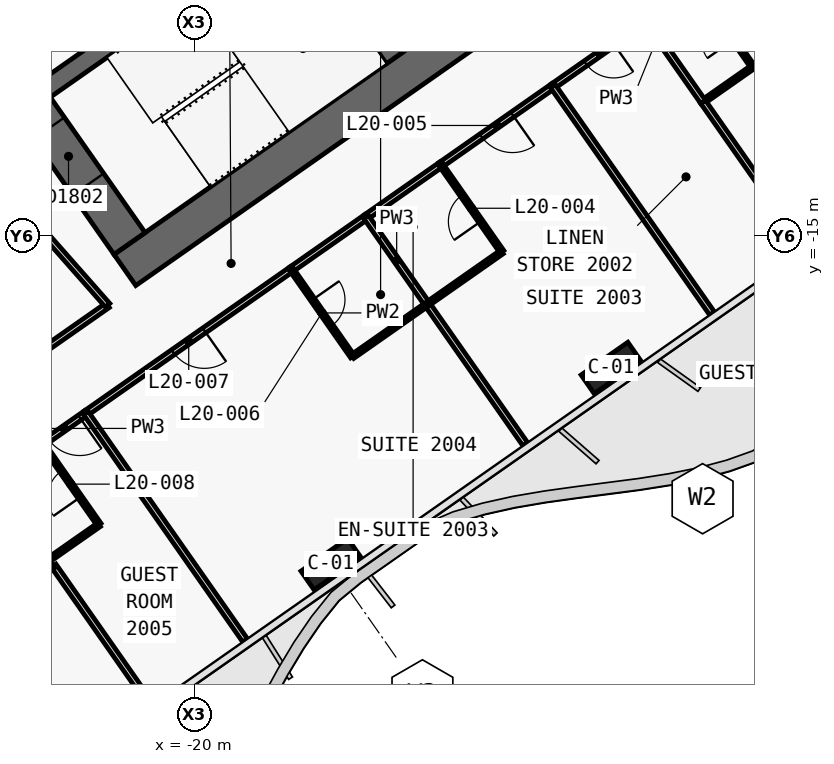
"""IFC4 building model, lengths in metres.
Left out: names, types, materials, properties, quantities, classifications, styles, units other than length and angle.
Written with IfcOpenShell. Run it as: python <this file> out.ifc"""

import sys

from ifc_helpers import new_model, si_unit, direction, frame, frame_2d, origin, origin_2d, place, context, subcontext, project, spatial, polyline, rectangle, outline, extrude, element, fill, save


model = new_model("IFC4")
c1 = context("Model", 3, precision=1e-05, world=origin(), true_north=direction((0.0, 1.0)))
c2 = subcontext(c1, "Body", "Model", "MODEL_VIEW")
j1 = project(units=[si_unit("LENGTHUNIT", "METRE"), si_unit("PLANEANGLEUNIT", "RADIAN")], contexts=[c1])
p1 = place(None, origin())
s1 = spatial("IfcSite", under=j1, at=p1, CompositionType="ELEMENT")
p2 = place(p1, origin())
s2 = spatial("IfcBuilding", under=s1, at=p2, CompositionType="ELEMENT")
p3 = place(p2, frame((0.0, 0.0, 97.7)))
s3 = spatial("IfcBuildingStorey", under=s2, at=p3, CompositionType="ELEMENT", Elevation=97.7)
p4 = place(p3, frame((0.037, -0.585, 0.0), z_axis=(0.0, 0.0, 1.0), x_axis=(-0.819157152511, -0.573569140985, 0.0)))
e1 = element("IfcWall", 1, at=p4, inside=s3, PredefinedType="SHEAR", context=c2, shape_type="SweptSolid", body=[
    extrude(outline(polyline([(26.695, 0.5), (0.7, 0.5), (0.0, -0.5), (26.695, -0.5), (26.695, 0.5)])), origin(), (0.0, 0.0, 1.0), 3.6),
])
p5 = place(p4, frame((2.995, 0.0, 0.0)))
e2 = element("IfcOpeningElement", 2, at=p5, cuts=e1, PredefinedType="OPENING", context=c2, shape_type="SweptSolid", body=[
    extrude(rectangle(XDim=2.4, YDim=2.1, at=frame_2d((1.2, 1.05))), frame((0.0, 0.51, 0.0), z_axis=(0.0, -1.0, 0.0), x_axis=(1.0, 0.0, 0.0)), (0.0, 0.0, 1.0), 1.02),
])
p6 = place(p4, frame((11.995, 0.0, 0.0)))
e3 = element("IfcOpeningElement", 3, at=p6, cuts=e1, PredefinedType="OPENING", context=c2, shape_type="SweptSolid", body=[
    extrude(rectangle(XDim=2.4, YDim=2.1, at=frame_2d((1.2, 1.05))), frame((0.0, 0.51, 0.0), z_axis=(0.0, -1.0, 0.0), x_axis=(1.0, 0.0, 0.0)), (0.0, 0.0, 1.0), 1.02),
])
p7 = place(p3, frame((-21.708, -15.2, 0.0), z_axis=(0.0, 0.0, 1.0), x_axis=(-0.573576324356, 0.819152122709, 0.0)))
e4 = element("IfcWall", 4, at=p7, inside=s3, PredefinedType="SHEAR", context=c2, shape_type="SweptSolid", body=[
    extrude(outline(polyline([(0.0, 0.5), (0.0, -0.5), (9.2, -0.5), (9.2, 0.5), (0.0, 0.5)])), origin(), (0.0, 0.0, 1.0), 3.6),
])
p8 = place(p7, frame((6.1, 0.0, 0.0)))
e5 = element("IfcOpeningElement", 5, at=p8, cuts=e4, PredefinedType="OPENING", context=c2, shape_type="SweptSolid", body=[
    extrude(rectangle(XDim=1.8, YDim=2.1, at=frame_2d((0.9, 1.05))), frame((0.0, 0.51, 0.0), z_axis=(0.0, -1.0, 0.0), x_axis=(1.0, 0.0, 0.0)), (0.0, 0.0, 1.0), 1.02),
])
p9 = place(p7, frame((1.9, 0.0, 0.0)))
e6 = element("IfcOpeningElement", 6, at=p9, cuts=e4, PredefinedType="OPENING", context=c2, shape_type="SweptSolid", body=[
    extrude(rectangle(XDim=1.8, YDim=2.1, at=frame_2d((0.9, 1.05))), frame((0.0, 0.51, 0.0), z_axis=(0.0, -1.0, 0.0), x_axis=(1.0, 0.0, 0.0)), (0.0, 0.0, 1.0), 1.02),
])
p10 = place(p3, frame((-14.745, -10.324, 0.0), z_axis=(0.0, 0.0, 1.0), x_axis=(-0.57356780395, 0.819158088694, 0.0)))
e7 = element("IfcWall", 7, at=p10, inside=s3, PredefinedType="SHEAR", context=c2, shape_type="SweptSolid", body=[
    extrude(outline(polyline([(4.35, 0.25), (0.0, 0.25), (0.0, -0.25), (4.35, -0.25), (4.35, 0.25)])), origin(), (0.0, 0.0, 1.0), 3.6),
])
p11 = place(p3, frame((-2.638, 3.768, 0.0), z_axis=(0.0, 0.0, 1.0), x_axis=(-0.819148977158, -0.573580816643, 0.0)))
e8 = element("IfcWall", 8, at=p11, inside=s3, PredefinedType="SHEAR", context=c2, shape_type="SweptSolid", body=[
    extrude(outline(polyline([(26.0, 0.25), (0.0, 0.25), (0.0, -0.25), (26.0, -0.25), (26.0, 0.25)])), origin(), (0.0, 0.0, 1.0), 3.6),
])
p12 = place(p11, frame((1.169, 0.0, 0.0)))
e9 = element("IfcOpeningElement", 9, at=p12, cuts=e8, PredefinedType="OPENING", context=c2, shape_type="SweptSolid", body=[
    extrude(rectangle(XDim=1.1, YDim=2.1, at=frame_2d((0.55, 1.05))), frame((0.0, 0.26, 0.0), z_axis=(0.0, -1.0, 0.0), x_axis=(1.0, 0.0, 0.0)), (0.0, 0.0, 1.0), 0.52),
])
p13 = place(p11, frame((3.206, 0.0, 0.0)))
e10 = element("IfcOpeningElement", 10, at=p13, cuts=e8, PredefinedType="OPENING", context=c2, shape_type="SweptSolid", body=[
    extrude(rectangle(XDim=1.1, YDim=2.1, at=frame_2d((0.55, 1.05))), frame((0.0, 0.26, 0.0), z_axis=(0.0, -1.0, 0.0), x_axis=(1.0, 0.0, 0.0)), (0.0, 0.0, 1.0), 0.52),
])
p14 = place(p11, frame((5.244, 0.0, 0.0)))
e11 = element("IfcOpeningElement", 11, at=p14, cuts=e8, PredefinedType="OPENING", context=c2, shape_type="SweptSolid", body=[
    extrude(rectangle(XDim=1.1, YDim=2.1, at=frame_2d((0.55, 1.05))), frame((0.0, 0.26, 0.0), z_axis=(0.0, -1.0, 0.0), x_axis=(1.0, 0.0, 0.0)), (0.0, 0.0, 1.0), 0.52),
])
p15 = place(p11, frame((7.281, 0.0, 0.0)))
e12 = element("IfcOpeningElement", 12, at=p15, cuts=e8, PredefinedType="OPENING", context=c2, shape_type="SweptSolid", body=[
    extrude(rectangle(XDim=1.1, YDim=2.1, at=frame_2d((0.55, 1.05))), frame((0.0, 0.26, 0.0), z_axis=(0.0, -1.0, 0.0), x_axis=(1.0, 0.0, 0.0)), (0.0, 0.0, 1.0), 0.52),
])
p16 = place(p11, frame((9.688, 0.0, 0.0)))
e13 = element("IfcOpeningElement", 13, at=p16, cuts=e8, PredefinedType="OPENING", context=c2, shape_type="SweptSolid", body=[
    extrude(rectangle(XDim=1.1, YDim=2.1, at=frame_2d((0.55, 1.05))), frame((0.0, 0.26, 0.0), z_axis=(0.0, -1.0, 0.0), x_axis=(1.0, 0.0, 0.0)), (0.0, 0.0, 1.0), 0.52),
])
p17 = place(p11, frame((11.863, 0.0, 0.0)))
e14 = element("IfcOpeningElement", 14, at=p17, cuts=e8, PredefinedType="OPENING", context=c2, shape_type="SweptSolid", body=[
    extrude(rectangle(XDim=1.1, YDim=2.1, at=frame_2d((0.55, 1.05))), frame((0.0, 0.26, 0.0), z_axis=(0.0, -1.0, 0.0), x_axis=(1.0, 0.0, 0.0)), (0.0, 0.0, 1.0), 0.52),
])
p18 = place(p11, frame((14.038, 0.0, 0.0)))
e15 = element("IfcOpeningElement", 15, at=p18, cuts=e8, PredefinedType="OPENING", context=c2, shape_type="SweptSolid", body=[
    extrude(rectangle(XDim=1.1, YDim=2.1, at=frame_2d((0.55, 1.05))), frame((0.0, 0.26, 0.0), z_axis=(0.0, -1.0, 0.0), x_axis=(1.0, 0.0, 0.0)), (0.0, 0.0, 1.0), 0.52),
])
p19 = place(p11, frame((16.212, 0.0, 0.0)))
e16 = element("IfcOpeningElement", 16, at=p19, cuts=e8, PredefinedType="OPENING", context=c2, shape_type="SweptSolid", body=[
    extrude(rectangle(XDim=1.1, YDim=2.1, at=frame_2d((0.55, 1.05))), frame((0.0, 0.26, 0.0), z_axis=(0.0, -1.0, 0.0), x_axis=(1.0, 0.0, 0.0)), (0.0, 0.0, 1.0), 0.52),
])
for number, where, z_axis, x_axis in (
    (17, (-9.038, -18.475, 0.0), (0.0, 0.0, 1.0), (-0.819, -0.574, 0.0)),
    (18, (-16.41, -23.637, 0.0), (0.0, 0.0, 1.0), (-0.819, -0.574, 0.0)),
):
    element("IfcColumn", number, at=place(p3, frame(where, z_axis=z_axis, x_axis=x_axis)), inside=s3, PredefinedType="COLUMN", context=c2, shape_type="SweptSolid", body=[
        extrude(rectangle(XDim=1.5, YDim=0.6, at=origin_2d()), origin(), (0.0, 0.0, 1.0), 3.6),
    ])
p20 = place(p3, frame((-28.917, -21.469, 0.0), z_axis=(0.0, 0.0, 1.0), x_axis=(0.819152599934, 0.573575642807, 0.0)))
e19 = element("IfcWall", 19, at=p20, inside=s3, PredefinedType="PARTITIONING", context=c2, shape_type="SweptSolid", body=[
    extrude(rectangle(XDim=8.098, YDim=0.15, at=frame_2d((4.049, 0.0))), origin(), (0.0, 0.0, 1.0), 2.6),
])
p21 = place(p20, frame((3.599, 0.0, 0.0)))
e20 = element("IfcOpeningElement", 20, at=p21, cuts=e19, PredefinedType="OPENING", context=c2, shape_type="SweptSolid", body=[
    extrude(rectangle(XDim=0.9, YDim=2.1, at=frame_2d((0.45, 1.05))), frame((0.0, 0.085, 0.0), z_axis=(0.0, -1.0, 0.0), x_axis=(1.0, 0.0, 0.0)), (0.0, 0.0, 1.0), 0.17),
])
p22 = place(p3, frame((-8.107, -9.339, 0.0), z_axis=(0.0, 0.0, 1.0), x_axis=(-0.819128818764, -0.573609604409, 0.0)))
e21 = element("IfcWall", 21, at=p22, inside=s3, PredefinedType="PARTITIONING", context=c2, shape_type="SweptSolid", body=[
    extrude(rectangle(XDim=3.004, YDim=0.15, at=frame_2d((1.502, 0.0))), origin(), (0.0, 0.0, 1.0), 3.32),
])
p23 = place(p22, frame((1.052, 0.0, 0.0)))
e22 = element("IfcOpeningElement", 22, at=p23, cuts=e21, PredefinedType="OPENING", context=c2, shape_type="SweptSolid", body=[
    extrude(rectangle(XDim=0.9, YDim=2.1, at=frame_2d((0.45, 1.05))), frame((0.0, 0.085, 0.0), z_axis=(0.0, -1.0, 0.0), x_axis=(1.0, 0.0, 0.0)), (0.0, 0.0, 1.0), 0.17),
])
p24 = place(p3, frame((-10.565, -11.06, 0.0), z_axis=(0.0, 0.0, 1.0), x_axis=(-0.819145961204, -0.573585123798, 0.0)))
e23 = element("IfcWall", 23, at=p24, inside=s3, PredefinedType="PARTITIONING", context=c2, shape_type="SweptSolid", body=[
    extrude(rectangle(XDim=3.603, YDim=0.15, at=frame_2d((1.802, 0.0))), origin(), (0.0, 0.0, 1.0), 2.6),
])
p25 = place(p24, frame((1.302, 0.0, 0.0)))
e24 = element("IfcOpeningElement", 24, at=p25, cuts=e23, PredefinedType="OPENING", context=c2, shape_type="SweptSolid", body=[
    extrude(rectangle(XDim=1.0, YDim=2.1, at=frame_2d((0.5, 1.05))), frame((0.0, 0.085, 0.0), z_axis=(0.0, -1.0, 0.0), x_axis=(1.0, 0.0, 0.0)), (0.0, 0.0, 1.0), 0.17),
])
p26 = place(p3, frame((-13.514, -13.125, 0.0), z_axis=(0.0, 0.0, 1.0), x_axis=(-0.819146032251, -0.573585022335, 0.0)))
e25 = element("IfcWall", 25, at=p26, inside=s3, PredefinedType="PARTITIONING", context=c2, shape_type="SweptSolid", body=[
    extrude(rectangle(XDim=2.404, YDim=0.15, at=frame_2d((1.202, 0.0))), origin(), (0.0, 0.0, 1.0), 3.32),
])
p27 = place(p3, frame((-17.447, -15.879, 0.0), z_axis=(0.0, 0.0, 1.0), x_axis=(-0.819153746897, -0.573574004767, 0.0)))
e26 = element("IfcWall", 26, at=p27, inside=s3, PredefinedType="PARTITIONING", context=c2, shape_type="SweptSolid", body=[
    extrude(rectangle(XDim=6.603, YDim=0.15, at=frame_2d((3.302, 0.0))), origin(), (0.0, 0.0, 1.0), 2.6),
])
p28 = place(p27, frame((2.801, 0.0, 0.0)))
e27 = element("IfcOpeningElement", 27, at=p28, cuts=e26, PredefinedType="OPENING", context=c2, shape_type="SweptSolid", body=[
    extrude(rectangle(XDim=1.0, YDim=2.1, at=frame_2d((0.5, 1.05))), frame((0.0, 0.085, 0.0), z_axis=(0.0, -1.0, 0.0), x_axis=(1.0, 0.0, 0.0)), (0.0, 0.0, 1.0), 0.17),
])
p29 = place(p3, frame((-15.48, -14.501, 0.0), z_axis=(0.0, 0.0, 1.0), x_axis=(-0.819179439794, -0.573537309527, 0.0)))
e28 = element("IfcWall", 28, at=p29, inside=s3, PredefinedType="PARTITIONING", context=c2, shape_type="SweptSolid", body=[
    extrude(rectangle(XDim=2.404, YDim=0.15, at=frame_2d((1.202, 0.0))), origin(), (0.0, 0.0, 1.0), 3.32),
])
p30 = place(p3, frame((-22.852, -19.664, 0.0), z_axis=(0.0, 0.0, 1.0), x_axis=(-0.81914197737, -0.573590813132, 0.0)))
e29 = element("IfcWall", 29, at=p30, inside=s3, PredefinedType="PARTITIONING", context=c2, shape_type="SweptSolid", body=[
    extrude(rectangle(XDim=1.403, YDim=0.15, at=frame_2d((0.701, 0.0))), origin(), (0.0, 0.0, 1.0), 3.32),
])
p31 = place(p30, frame((0.202, 0.0, 0.0)))
e30 = element("IfcOpeningElement", 30, at=p31, cuts=e29, PredefinedType="OPENING", context=c2, shape_type="SweptSolid", body=[
    extrude(rectangle(XDim=1.0, YDim=2.1, at=frame_2d((0.5, 1.05))), frame((0.0, 0.085, 0.0), z_axis=(0.0, -1.0, 0.0), x_axis=(1.0, 0.0, 0.0)), (0.0, 0.0, 1.0), 0.17),
])
p32 = place(p3, frame((-1.849, -13.051, 0.0), z_axis=(0.0, 0.0, 1.0), x_axis=(-0.573575988258, 0.819152358047, 0.0)))
e31 = element("IfcWall", 31, at=p32, inside=s3, PredefinedType="PARTITIONING", context=c2, shape_type="SweptSolid", body=[
    extrude(rectangle(XDim=6.632, YDim=0.15, at=frame_2d((3.316, 0.0))), origin(), (0.0, 0.0, 1.0), 2.6),
])
p33 = place(p3, frame((-22.284, -16.827, 0.0), z_axis=(0.0, 0.0, 1.0), x_axis=(-0.661545117561, 0.749905365651, 0.0)))
e32 = element("IfcWall", 32, at=p33, inside=s3, PredefinedType="PARTITIONING", context=c2, shape_type="SweptSolid", body=[
    extrude(rectangle(XDim=6.543, YDim=0.15, at=frame_2d((3.271, 0.0))), origin(), (0.0, 0.0, 1.0), 2.6),
])
p34 = place(p3, frame((-6.617, -11.471, 0.0), z_axis=(0.0, 0.0, 1.0), x_axis=(0.819131543282, 0.57360571371, 0.0)))
e33 = element("IfcWall", 33, at=p34, inside=s3, PredefinedType="PARTITIONING", context=c2, shape_type="SweptSolid", body=[
    extrude(rectangle(XDim=1.6, YDim=0.12, at=frame_2d((0.8, 0.0))), origin(), (0.0, 0.0, 1.0), 3.32),
])
p35 = place(p3, frame((-5.306, -10.552, 0.0), z_axis=(0.0, 0.0, 1.0), x_axis=(-0.573537965655, 0.819178980414, 0.0)))
e34 = element("IfcWall", 34, at=p35, inside=s3, PredefinedType="PARTITIONING", context=c2, shape_type="SweptSolid", body=[
    extrude(rectangle(XDim=2.6, YDim=0.12, at=frame_2d((1.3, 0.0))), origin(), (0.0, 0.0, 1.0), 3.32),
])
p36 = place(p35, frame((0.875, 0.0, 0.0)))
e35 = element("IfcOpeningElement", 35, at=p36, cuts=e34, PredefinedType="OPENING", context=c2, shape_type="SweptSolid", body=[
    extrude(rectangle(XDim=0.85, YDim=2.05, at=frame_2d((0.425, 1.025))), frame((0.0, 0.07, 0.0), z_axis=(0.0, -1.0, 0.0), x_axis=(1.0, 0.0, 0.0)), (0.0, 0.0, 1.0), 0.14),
])
p37 = place(p3, frame((-3.922, -15.32, 0.0), z_axis=(0.0, 0.0, 1.0), x_axis=(-0.573535567792, 0.819180659243, 0.0)))
e36 = element("IfcWall", 36, at=p37, inside=s3, PredefinedType="PARTITIONING", context=c2, shape_type="SweptSolid", body=[
    extrude(rectangle(XDim=4.699, YDim=0.15, at=frame_2d((2.35, 0.0))), origin(), (0.0, 0.0, 1.0), 2.5),
])
p38 = place(p3, frame((-6.618, -11.47, 0.0), z_axis=(0.0, 0.0, 1.0), x_axis=(-0.573537965655, 0.819178980414, 0.0)))
e37 = element("IfcWall", 37, at=p38, inside=s3, PredefinedType="PARTITIONING", context=c2, shape_type="SweptSolid", body=[
    extrude(rectangle(XDim=2.6, YDim=0.15, at=frame_2d((1.3, 0.0))), origin(), (0.0, 0.0, 1.0), 3.32),
])
p39 = place(p3, frame((-6.379, -17.041, 0.0), z_axis=(0.0, 0.0, 1.0), x_axis=(-0.573579051994, 0.81915021279, 0.0)))
e38 = element("IfcWall", 38, at=p39, inside=s3, PredefinedType="PARTITIONING", context=c2, shape_type="SweptSolid", body=[
    extrude(rectangle(XDim=7.3, YDim=0.15, at=frame_2d((3.65, 0.0))), origin(), (0.0, 0.0, 1.0), 2.5),
])
p40 = place(p3, frame((-13.875, -16.797, 0.0), z_axis=(0.0, 0.0, 1.0), x_axis=(0.819141114317, 0.573592045652, 0.0)))
e39 = element("IfcWall", 39, at=p40, inside=s3, PredefinedType="PARTITIONING", context=c2, shape_type="SweptSolid", body=[
    extrude(rectangle(XDim=2.4, YDim=0.12, at=frame_2d((1.2, 0.0))), origin(), (0.0, 0.0, 1.0), 3.32),
])
p41 = place(p3, frame((-11.909, -15.419, 0.0), z_axis=(0.0, 0.0, 1.0), x_axis=(-0.573591086599, 0.819141785879, 0.0)))
e40 = element("IfcWall", 40, at=p41, inside=s3, PredefinedType="PARTITIONING", context=c2, shape_type="SweptSolid", body=[
    extrude(rectangle(XDim=2.8, YDim=0.12, at=frame_2d((1.4, 0.0))), origin(), (0.0, 0.0, 1.0), 3.32),
])
p42 = place(p41, frame((0.975, 0.0, 0.0)))
e41 = element("IfcOpeningElement", 41, at=p42, cuts=e40, PredefinedType="OPENING", context=c2, shape_type="SweptSolid", body=[
    extrude(rectangle(XDim=0.85, YDim=2.05, at=frame_2d((0.425, 1.025))), frame((0.0, 0.07, 0.0), z_axis=(0.0, -1.0, 0.0), x_axis=(1.0, 0.0, 0.0)), (0.0, 0.0, 1.0), 0.14),
])
p43 = place(p3, frame((-11.294, -20.482, 0.0), z_axis=(0.0, 0.0, 1.0), x_axis=(-0.573589807488, 0.819142681555, 0.0)))
e42 = element("IfcWall", 42, at=p43, inside=s3, PredefinedType="PARTITIONING", context=c2, shape_type="SweptSolid", body=[
    extrude(rectangle(XDim=4.499, YDim=0.15, at=frame_2d((2.25, 0.0))), origin(), (0.0, 0.0, 1.0), 2.5),
])
p44 = place(p3, frame((-13.875, -16.796, 0.0), z_axis=(0.0, 0.0, 1.0), x_axis=(-0.573591086599, 0.819141785879, 0.0)))
e43 = element("IfcWall", 43, at=p44, inside=s3, PredefinedType="PARTITIONING", context=c2, shape_type="SweptSolid", body=[
    extrude(rectangle(XDim=2.8, YDim=0.15, at=frame_2d((1.4, 0.0))), origin(), (0.0, 0.0, 1.0), 3.32),
])
p45 = place(p3, frame((-17.448, -15.88, 0.0), z_axis=(0.0, 0.0, 1.0), x_axis=(0.573550118428, -0.819170471667, 0.0)))
e44 = element("IfcWall", 44, at=p45, inside=s3, PredefinedType="PARTITIONING", context=c2, shape_type="SweptSolid", body=[
    extrude(rectangle(XDim=2.8, YDim=0.12, at=frame_2d((1.4, 0.0))), origin(), (0.0, 0.0, 1.0), 3.32),
])
p46 = place(p45, frame((0.975, 0.0, 0.0)))
e45 = element("IfcOpeningElement", 45, at=p46, cuts=e44, PredefinedType="OPENING", context=c2, shape_type="SweptSolid", body=[
    extrude(rectangle(XDim=0.85, YDim=2.05, at=frame_2d((0.425, 1.025))), frame((0.0, 0.07, 0.0), z_axis=(0.0, -1.0, 0.0), x_axis=(1.0, 0.0, 0.0)), (0.0, 0.0, 1.0), 0.14),
])
p47 = place(p3, frame((-15.841, -18.174, 0.0), z_axis=(0.0, 0.0, 1.0), x_axis=(0.819155442668, 0.573571582932, 0.0)))
e46 = element("IfcWall", 46, at=p47, inside=s3, PredefinedType="PARTITIONING", context=c2, shape_type="SweptSolid", body=[
    extrude(rectangle(XDim=2.4, YDim=0.12, at=frame_2d((1.2, 0.0))), origin(), (0.0, 0.0, 1.0), 3.32),
])
p48 = place(p3, frame((-18.667, -25.645, 0.0), z_axis=(0.0, 0.0, 1.0), x_axis=(-0.573572324301, 0.819154923562, 0.0)))
e47 = element("IfcWall", 47, at=p48, inside=s3, PredefinedType="PARTITIONING", context=c2, shape_type="SweptSolid", body=[
    extrude(rectangle(XDim=7.3, YDim=0.15, at=frame_2d((3.65, 0.0))), origin(), (0.0, 0.0, 1.0), 2.5),
])
p49 = place(p3, frame((-23.819, -23.516, 0.0), z_axis=(0.0, 0.0, 1.0), x_axis=(0.819131543282, 0.57360571371, 0.0)))
e48 = element("IfcWall", 48, at=p49, inside=s3, PredefinedType="PARTITIONING", context=c2, shape_type="SweptSolid", body=[
    extrude(rectangle(XDim=1.6, YDim=0.12, at=frame_2d((0.8, 0.0))), origin(), (0.0, 0.0, 1.0), 3.32),
])
p50 = place(p3, frame((-22.509, -22.597, 0.0), z_axis=(0.0, 0.0, 1.0), x_axis=(-0.573582085028, 0.819148089014, 0.0)))
e49 = element("IfcWall", 49, at=p50, inside=s3, PredefinedType="PARTITIONING", context=c2, shape_type="SweptSolid", body=[
    extrude(rectangle(XDim=2.6, YDim=0.12, at=frame_2d((1.3, 0.0))), origin(), (0.0, 0.0, 1.0), 3.32),
])
p51 = place(p50, frame((0.875, 0.0, 0.0)))
e50 = element("IfcOpeningElement", 50, at=p51, cuts=e49, PredefinedType="OPENING", context=c2, shape_type="SweptSolid", body=[
    extrude(rectangle(XDim=0.85, YDim=2.05, at=frame_2d((0.425, 1.025))), frame((0.0, 0.07, 0.0), z_axis=(0.0, -1.0, 0.0), x_axis=(1.0, 0.0, 0.0)), (0.0, 0.0, 1.0), 0.14),
])
p52 = place(p3, frame((-21.124, -27.365, 0.0), z_axis=(0.0, 0.0, 1.0), x_axis=(-0.573556991349, 0.819165659482, 0.0)))
e51 = element("IfcWall", 51, at=p52, inside=s3, PredefinedType="PARTITIONING", context=c2, shape_type="SweptSolid", body=[
    extrude(rectangle(XDim=4.501, YDim=0.15, at=frame_2d((2.25, 0.0))), origin(), (0.0, 0.0, 1.0), 2.5),
])
p53 = place(p3, frame((-25.671, -25.056, 0.0), z_axis=(0.0, 0.0, 1.0), x_axis=(0.819188907105, 0.573523787192, 0.0)))
e52 = element("IfcWall", 52, at=p53, inside=s3, PredefinedType="PARTITIONING", context=c2, shape_type="SweptSolid", body=[
    extrude(rectangle(XDim=2.4, YDim=0.12, at=frame_2d((1.2, 0.0))), origin(), (0.0, 0.0, 1.0), 3.32),
])
p54 = place(p9, origin())
e53 = element("IfcDoor", 53, at=p54, inside=s3, OperationType="DOUBLE_DOOR_SINGLE_SWING", PredefinedType="DOOR", context=c2, shape_type="SweptSolid", body=[
    extrude(rectangle(XDim=1.8, YDim=2.1, at=frame_2d((0.9, 1.05))), frame((0.0, 0.025, 0.0), z_axis=(0.0, -1.0, 0.0), x_axis=(1.0, 0.0, 0.0)), (0.0, 0.0, 1.0), 0.05),
])
fill(e6, e53)
p55 = place(p23, origin())
e54 = element("IfcDoor", 54, at=p55, inside=s3, OperationType="SINGLE_SWING_RIGHT", PredefinedType="DOOR", context=c2, shape_type="SweptSolid", body=[
    extrude(rectangle(XDim=0.9, YDim=2.1, at=frame_2d((0.45, 1.05))), frame((0.0, 0.025, 0.0), z_axis=(0.0, -1.0, 0.0), x_axis=(1.0, 0.0, 0.0)), (0.0, 0.0, 1.0), 0.05),
])
fill(e22, e54)
p56 = place(p42, origin())
e55 = element("IfcDoor", 55, at=p56, inside=s3, OperationType="SINGLE_SWING_RIGHT", PredefinedType="DOOR", context=c2, shape_type="SweptSolid", body=[
    extrude(rectangle(XDim=0.85, YDim=2.05, at=frame_2d((0.425, 1.025))), frame((0.0, 0.025, 0.0), z_axis=(0.0, -1.0, 0.0), x_axis=(1.0, 0.0, 0.0)), (0.0, 0.0, 1.0), 0.05),
])
fill(e41, e55)
p57 = place(p25, origin())
e56 = element("IfcDoor", 56, at=p57, inside=s3, OperationType="SINGLE_SWING_LEFT", PredefinedType="DOOR", context=c2, shape_type="SweptSolid", body=[
    extrude(rectangle(XDim=1.0, YDim=2.1, at=frame_2d((0.5, 1.05))), frame((0.0, 0.025, 0.0), z_axis=(0.0, -1.0, 0.0), x_axis=(1.0, 0.0, 0.0)), (0.0, 0.0, 1.0), 0.05),
])
fill(e24, e56)
p58 = place(p46, origin())
e57 = element("IfcDoor", 57, at=p58, inside=s3, OperationType="SINGLE_SWING_RIGHT", PredefinedType="DOOR", context=c2, shape_type="SweptSolid", body=[
    extrude(rectangle(XDim=0.85, YDim=2.05, at=frame_2d((0.425, 1.025))), frame((0.0, 0.025, 0.0), z_axis=(0.0, -1.0, 0.0), x_axis=(1.0, 0.0, 0.0)), (0.0, 0.0, 1.0), 0.05),
])
fill(e45, e57)
p59 = place(p28, origin())
e58 = element("IfcDoor", 58, at=p59, inside=s3, OperationType="SINGLE_SWING_RIGHT", PredefinedType="DOOR", context=c2, shape_type="SweptSolid", body=[
    extrude(rectangle(XDim=1.0, YDim=2.1, at=frame_2d((0.5, 1.05))), frame((0.0, 0.025, 0.0), z_axis=(0.0, -1.0, 0.0), x_axis=(1.0, 0.0, 0.0)), (0.0, 0.0, 1.0), 0.05),
])
fill(e27, e58)
p60 = place(p51, origin())
e59 = element("IfcDoor", 59, at=p60, inside=s3, OperationType="SINGLE_SWING_LEFT", PredefinedType="DOOR", context=c2, shape_type="SweptSolid", body=[
    extrude(rectangle(XDim=0.85, YDim=2.05, at=frame_2d((0.425, 1.025))), frame((0.0, 0.025, 0.0), z_axis=(0.0, -1.0, 0.0), x_axis=(1.0, 0.0, 0.0)), (0.0, 0.0, 1.0), 0.05),
])
fill(e50, e59)
p61 = place(p31, origin())
e60 = element("IfcDoor", 60, at=p61, inside=s3, OperationType="SINGLE_SWING_RIGHT", PredefinedType="DOOR", context=c2, shape_type="SweptSolid", body=[
    extrude(rectangle(XDim=1.0, YDim=2.1, at=frame_2d((0.5, 1.05))), frame((0.0, 0.025, 0.0), z_axis=(0.0, -1.0, 0.0), x_axis=(1.0, 0.0, 0.0)), (0.0, 0.0, 1.0), 0.05),
])
fill(e30, e60)
save(model, sys.argv[1])
